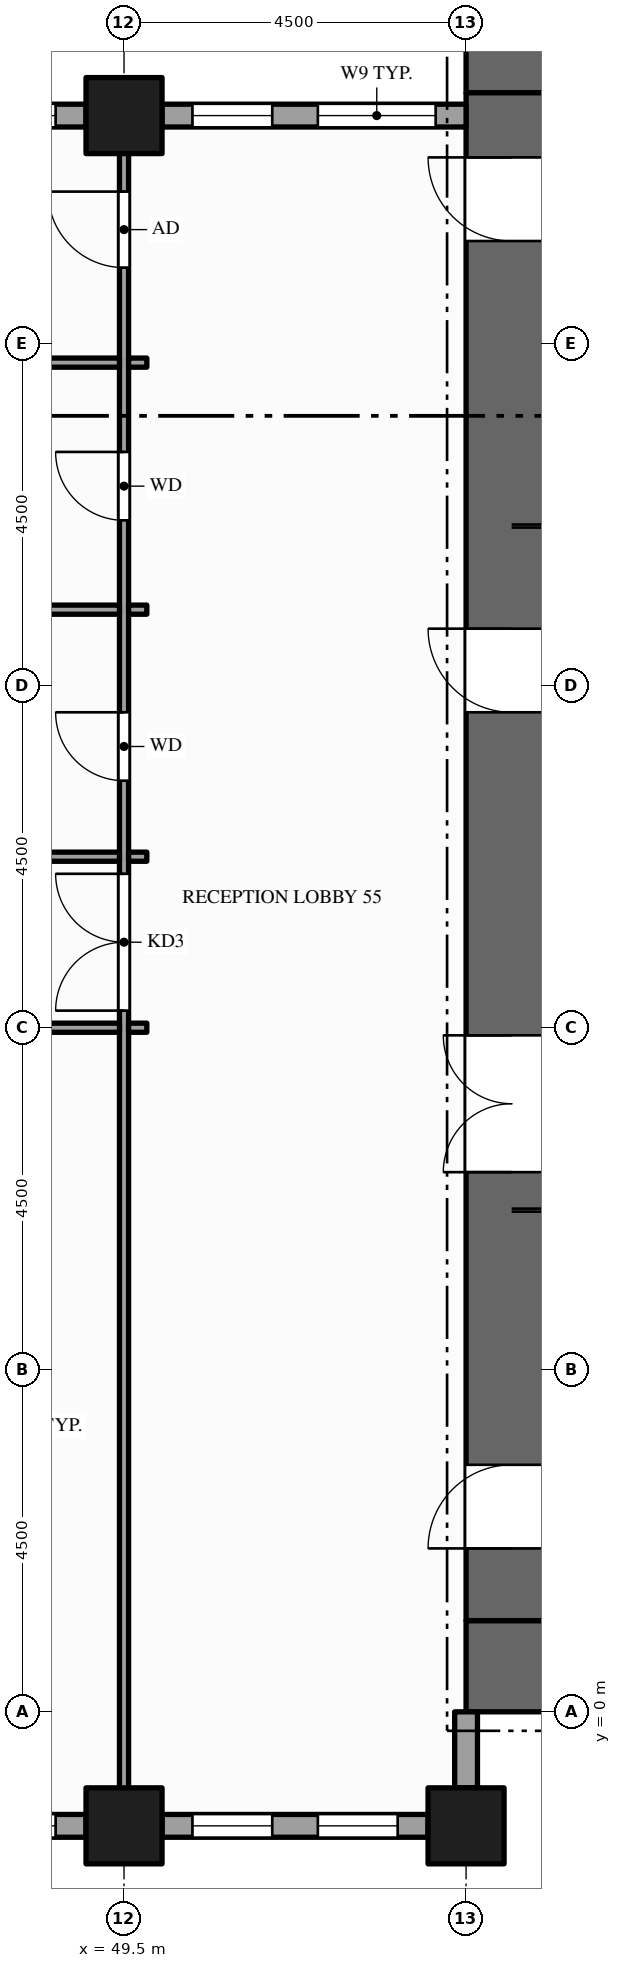
"""IFC4 building model, lengths in metres.
Left out: names, types, materials, properties, quantities, classifications, styles, units other than length and angle.
Written with IfcOpenShell. Run it as: python <this file> out.ifc"""

import sys

from ifc_helpers import new_model, si_unit, direction, frame, frame_2d, origin, origin_2d, place, context, subcontext, project, spatial, rectangle, hollow_rectangle, extrude, element, fill, save


model = new_model("IFC4")
c1 = context("Model", 3, precision=1e-05, world=origin(), true_north=direction((0.0, 1.0)))
c2 = subcontext(c1, "Body", "Model", "MODEL_VIEW")
j1 = project(units=[si_unit("LENGTHUNIT", "METRE"), si_unit("PLANEANGLEUNIT", "RADIAN")], contexts=[c1])
p1 = place(None, origin())
s1 = spatial("IfcSite", under=j1, at=p1, CompositionType="ELEMENT")
p2 = place(p1, origin())
s2 = spatial("IfcBuilding", under=s1, at=p2, CompositionType="ELEMENT")
p3 = place(p2, frame((0.0, 0.0, 95.0)))
s3 = spatial("IfcBuildingStorey", under=s2, at=p3, CompositionType="ELEMENT", Elevation=95.0)
for number, where, z_axis, x_axis in (
    (1, (67.5, 0.6, -0.15), (0.0, 0.0, 1.0), (-1.0, 0.0, 0.0)),
    (2, (54.0, 21.9, -0.15), (0.0, 0.0, 1.0), (1.0, 0.0, 0.0)),
):
    element("IfcWall", number, at=place(p3, frame(where, z_axis=z_axis, x_axis=x_axis)), inside=s3, PredefinedType="SHEAR", context=c2, shape_type="SweptSolid", body=[
        extrude(rectangle(XDim=13.5, YDim=1.2, at=frame_2d((6.75, 0.0))), origin(), (0.0, 0.0, 1.0), 4.0),
    ])
p4 = place(p3, frame((54.6, 1.2, -0.15), z_axis=(0.0, 0.0, 1.0), x_axis=(0.0, 1.0, 0.0)))
e3 = element("IfcWall", 3, at=p4, inside=s3, PredefinedType="SHEAR", context=c2, shape_type="SweptSolid", body=[
    extrude(rectangle(XDim=20.1, YDim=1.2, at=frame_2d((10.05, 0.0))), origin(), (0.0, 0.0, 1.0), 4.0),
])
p5 = place(p4, frame((5.9, 0.0, 0.15)))
e4 = element("IfcOpeningElement", 4, at=p5, cuts=e3, PredefinedType="OPENING", context=c2, shape_type="SweptSolid", body=[
    extrude(rectangle(XDim=1.8, YDim=2.1, at=frame_2d((0.9, 1.05))), frame((0.0, 0.61, 0.0), z_axis=(0.0, -1.0, 0.0), x_axis=(1.0, 0.0, 0.0)), (0.0, 0.0, 1.0), 1.22),
])
p6 = place(p4, frame((11.95, 0.0, 0.15)))
e5 = element("IfcOpeningElement", 5, at=p6, cuts=e3, PredefinedType="OPENING", context=c2, shape_type="SweptSolid", body=[
    extrude(rectangle(XDim=1.1, YDim=2.1, at=frame_2d((0.55, 1.05))), frame((0.0, 0.61, 0.0), z_axis=(0.0, -1.0, 0.0), x_axis=(1.0, 0.0, 0.0)), (0.0, 0.0, 1.0), 1.22),
])
p7 = place(p4, frame((0.95, 0.0, 0.15)))
e6 = element("IfcOpeningElement", 6, at=p7, cuts=e3, PredefinedType="OPENING", context=c2, shape_type="SweptSolid", body=[
    extrude(rectangle(XDim=1.1, YDim=2.1, at=frame_2d((0.55, 1.05))), frame((0.0, 0.61, 0.0), z_axis=(0.0, -1.0, 0.0), x_axis=(1.0, 0.0, 0.0)), (0.0, 0.0, 1.0), 1.22),
])
p8 = place(p4, frame((18.15, 0.0, 0.15)))
e7 = element("IfcOpeningElement", 7, at=p8, cuts=e3, PredefinedType="OPENING", context=c2, shape_type="SweptSolid", body=[
    extrude(rectangle(XDim=1.1, YDim=2.1, at=frame_2d((0.55, 1.05))), frame((0.0, 0.61, 0.0), z_axis=(0.0, -1.0, 0.0), x_axis=(1.0, 0.0, 0.0)), (0.0, 0.0, 1.0), 1.22),
])
for number, where, z_axis, x_axis in (
    (8, (49.5, -1.5, -0.15), (0.0, 0.0, 1.0), (1.0, 0.0, 0.0)),
    (9, (49.5, 21.0, -0.15), (0.0, 0.0, 1.0), (1.0, 0.0, 0.0)),
    (10, (54.0, -1.5, -0.15), (0.0, 0.0, 1.0), (1.0, 0.0, 0.0)),
):
    element("IfcColumn", number, at=place(p3, frame(where, z_axis=z_axis, x_axis=x_axis)), inside=s3, PredefinedType="COLUMN", context=c2, shape_type="SweptSolid", body=[
        extrude(hollow_rectangle(XDim=1.0, YDim=1.0, WallThickness=0.05, at=origin_2d()), origin(), (0.0, 0.0, 1.0), 4.0),
    ])
p9 = place(p3, frame((45.5, -1.5, 0.0), z_axis=(0.0, 0.0, 1.0), x_axis=(1.0, 0.0, 0.0)))
e11 = element("IfcWall", 11, at=p9, inside=s3, PredefinedType="STANDARD", context=c2, shape_type="SweptSolid", body=[
    extrude(rectangle(XDim=3.5, YDim=0.3, at=frame_2d((1.75, 0.0))), origin(), (0.0, 0.0, 1.0), 3.154),
])
p10 = place(p9, frame((0.4, 0.0, 0.9)))
e12 = element("IfcOpeningElement", 12, at=p10, cuts=e11, PredefinedType="OPENING", context=c2, shape_type="SweptSolid", body=[
    extrude(rectangle(XDim=1.05, YDim=2.0, at=frame_2d((0.525, 1.0))), frame((0.0, 0.16, 0.0), z_axis=(0.0, -1.0, 0.0), x_axis=(1.0, 0.0, 0.0)), (0.0, 0.0, 1.0), 0.32),
])
p11 = place(p9, frame((2.05, 0.0, 0.9)))
e13 = element("IfcOpeningElement", 13, at=p11, cuts=e11, PredefinedType="OPENING", context=c2, shape_type="SweptSolid", body=[
    extrude(rectangle(XDim=1.05, YDim=2.0, at=frame_2d((0.525, 1.0))), frame((0.0, 0.16, 0.0), z_axis=(0.0, -1.0, 0.0), x_axis=(1.0, 0.0, 0.0)), (0.0, 0.0, 1.0), 0.32),
])
p12 = place(p3, frame((50.0, -1.5, 0.0), z_axis=(0.0, 0.0, 1.0), x_axis=(1.0, 0.0, 0.0)))
e14 = element("IfcWall", 14, at=p12, inside=s3, PredefinedType="STANDARD", context=c2, shape_type="SweptSolid", body=[
    extrude(rectangle(XDim=3.5, YDim=0.3, at=frame_2d((1.75, 0.0))), origin(), (0.0, 0.0, 1.0), 3.154),
])
p13 = place(p12, frame((0.4, 0.0, 0.9)))
e15 = element("IfcOpeningElement", 15, at=p13, cuts=e14, PredefinedType="OPENING", context=c2, shape_type="SweptSolid", body=[
    extrude(rectangle(XDim=1.05, YDim=2.0, at=frame_2d((0.525, 1.0))), frame((0.0, 0.16, 0.0), z_axis=(0.0, -1.0, 0.0), x_axis=(1.0, 0.0, 0.0)), (0.0, 0.0, 1.0), 0.32),
])
p14 = place(p12, frame((2.05, 0.0, 0.9)))
e16 = element("IfcOpeningElement", 16, at=p14, cuts=e14, PredefinedType="OPENING", context=c2, shape_type="SweptSolid", body=[
    extrude(rectangle(XDim=1.05, YDim=2.0, at=frame_2d((0.525, 1.0))), frame((0.0, 0.16, 0.0), z_axis=(0.0, -1.0, 0.0), x_axis=(1.0, 0.0, 0.0)), (0.0, 0.0, 1.0), 0.32),
])
p15 = place(p3, frame((54.0, -1.0, 0.0), z_axis=(0.0, 0.0, 1.0), x_axis=(0.0, 1.0, 0.0)))
e17 = element("IfcWall", 17, at=p15, inside=s3, PredefinedType="STANDARD", context=c2, shape_type="SweptSolid", body=[
    extrude(rectangle(XDim=1.0, YDim=0.3, at=frame_2d((0.5, 0.0))), origin(), (0.0, 0.0, 1.0), 3.154),
])
p16 = place(p3, frame((54.0, 21.0, 0.0), z_axis=(0.0, 0.0, 1.0), x_axis=(-1.0, 0.0, 0.0)))
e18 = element("IfcWall", 18, at=p16, inside=s3, PredefinedType="STANDARD", context=c2, shape_type="SweptSolid", body=[
    extrude(rectangle(XDim=4.0, YDim=0.3, at=frame_2d((2.0, 0.0))), origin(), (0.0, 0.0, 1.0), 3.154),
])
p17 = place(p16, frame((0.4, 0.0, 0.9)))
e19 = element("IfcOpeningElement", 19, at=p17, cuts=e18, PredefinedType="OPENING", context=c2, shape_type="SweptSolid", body=[
    extrude(rectangle(XDim=1.55, YDim=2.0, at=frame_2d((0.775, 1.0))), frame((0.0, 0.16, 0.0), z_axis=(0.0, -1.0, 0.0), x_axis=(1.0, 0.0, 0.0)), (0.0, 0.0, 1.0), 0.32),
])
p18 = place(p16, frame((2.55, 0.0, 0.9)))
e20 = element("IfcOpeningElement", 20, at=p18, cuts=e18, PredefinedType="OPENING", context=c2, shape_type="SweptSolid", body=[
    extrude(rectangle(XDim=1.05, YDim=2.0, at=frame_2d((0.525, 1.0))), frame((0.0, 0.16, 0.0), z_axis=(0.0, -1.0, 0.0), x_axis=(1.0, 0.0, 0.0)), (0.0, 0.0, 1.0), 0.32),
])
p19 = place(p3, frame((49.0, 21.0, 0.0), z_axis=(0.0, 0.0, 1.0), x_axis=(-1.0, 0.0, 0.0)))
e21 = element("IfcWall", 21, at=p19, inside=s3, PredefinedType="STANDARD", context=c2, shape_type="SweptSolid", body=[
    extrude(rectangle(XDim=3.5, YDim=0.3, at=frame_2d((1.75, 0.0))), origin(), (0.0, 0.0, 1.0), 3.154),
])
p20 = place(p19, frame((0.4, 0.0, 0.9)))
e22 = element("IfcOpeningElement", 22, at=p20, cuts=e21, PredefinedType="OPENING", context=c2, shape_type="SweptSolid", body=[
    extrude(rectangle(XDim=1.05, YDim=2.0, at=frame_2d((0.525, 1.0))), frame((0.0, 0.16, 0.0), z_axis=(0.0, -1.0, 0.0), x_axis=(1.0, 0.0, 0.0)), (0.0, 0.0, 1.0), 0.32),
])
p21 = place(p19, frame((2.05, 0.0, 0.9)))
e23 = element("IfcOpeningElement", 23, at=p21, cuts=e21, PredefinedType="OPENING", context=c2, shape_type="SweptSolid", body=[
    extrude(rectangle(XDim=1.05, YDim=2.0, at=frame_2d((0.525, 1.0))), frame((0.0, 0.16, 0.0), z_axis=(0.0, -1.0, 0.0), x_axis=(1.0, 0.0, 0.0)), (0.0, 0.0, 1.0), 0.32),
])
p22 = place(p3, frame((49.5, -1.35, 0.0), z_axis=(0.0, 0.0, 1.0), x_axis=(0.0, 1.0, 0.0)))
e24 = element("IfcWall", 24, at=p22, inside=s3, PredefinedType="PARTITIONING", context=c2, shape_type="SweptSolid", body=[
    extrude(rectangle(XDim=22.2, YDim=0.12, at=frame_2d((11.1, 0.0))), origin(), (0.0, 0.0, 1.0), 2.938),
])
p23 = place(p22, frame((10.575, 0.0, 0.0)))
e25 = element("IfcOpeningElement", 25, at=p23, cuts=e24, PredefinedType="OPENING", context=c2, shape_type="SweptSolid", body=[
    extrude(rectangle(XDim=1.8, YDim=2.1, at=frame_2d((0.9, 1.05))), frame((0.0, 0.07, 0.0), z_axis=(0.0, -1.0, 0.0), x_axis=(1.0, 0.0, 0.0)), (0.0, 0.0, 1.0), 0.14),
])
p24 = place(p22, frame((13.6, 0.0, 0.0)))
e26 = element("IfcOpeningElement", 26, at=p24, cuts=e24, PredefinedType="OPENING", context=c2, shape_type="SweptSolid", body=[
    extrude(rectangle(XDim=0.9, YDim=2.1, at=frame_2d((0.45, 1.05))), frame((0.0, 0.07, 0.0), z_axis=(0.0, -1.0, 0.0), x_axis=(1.0, 0.0, 0.0)), (0.0, 0.0, 1.0), 0.14),
])
p25 = place(p22, frame((17.025, 0.0, 0.0)))
e27 = element("IfcOpeningElement", 27, at=p25, cuts=e24, PredefinedType="OPENING", context=c2, shape_type="SweptSolid", body=[
    extrude(rectangle(XDim=0.9, YDim=2.1, at=frame_2d((0.45, 1.05))), frame((0.0, 0.07, 0.0), z_axis=(0.0, -1.0, 0.0), x_axis=(1.0, 0.0, 0.0)), (0.0, 0.0, 1.0), 0.14),
])
p26 = place(p22, frame((20.35, 0.0, 0.0)))
e28 = element("IfcOpeningElement", 28, at=p26, cuts=e24, PredefinedType="OPENING", context=c2, shape_type="SweptSolid", body=[
    extrude(rectangle(XDim=1.0, YDim=2.1, at=frame_2d((0.5, 1.05))), frame((0.0, 0.07, 0.0), z_axis=(0.0, -1.0, 0.0), x_axis=(1.0, 0.0, 0.0)), (0.0, 0.0, 1.0), 0.14),
])
p27 = place(p3, frame((42.81, 9.0, 0.0), z_axis=(0.0, 0.0, 1.0), x_axis=(1.0, 0.0, 0.0)))
e29 = element("IfcWall", 29, at=p27, inside=s3, PredefinedType="PARTITIONING", context=c2, shape_type="SweptSolid", body=[
    extrude(rectangle(XDim=6.63, YDim=0.12, at=frame_2d((3.315, 0.0))), origin(), (0.0, 0.0, 1.0), 2.938),
])
p28 = place(p27, frame((2.815, 0.0, 0.0)))
e30 = element("IfcOpeningElement", 30, at=p28, cuts=e29, PredefinedType="OPENING", context=c2, shape_type="SweptSolid", body=[
    extrude(rectangle(XDim=1.0, YDim=2.1, at=frame_2d((0.5, 1.05))), frame((0.0, 0.07, 0.0), z_axis=(0.0, -1.0, 0.0), x_axis=(1.0, 0.0, 0.0)), (0.0, 0.0, 1.0), 0.14),
])
p29 = place(p3, frame((49.56, 9.0, 0.0), z_axis=(0.0, 0.0, 1.0), x_axis=(1.0, 0.0, 0.0)))
e31 = element("IfcWall", 31, at=p29, inside=s3, PredefinedType="PARTITIONING", context=c2, shape_type="SweptSolid", body=[
    extrude(rectangle(XDim=0.24, YDim=0.12, at=frame_2d((0.12, 0.0))), origin(), (0.0, 0.0, 1.0), 2.938),
])
p30 = place(p3, frame((45.06, 11.25, 0.0), z_axis=(0.0, 0.0, 1.0), x_axis=(1.0, 0.0, 0.0)))
e32 = element("IfcWall", 32, at=p30, inside=s3, PredefinedType="PARTITIONING", context=c2, shape_type="SweptSolid", body=[
    extrude(rectangle(XDim=4.38, YDim=0.12, at=frame_2d((2.19, 0.0))), origin(), (0.0, 0.0, 1.0), 2.938),
])
p31 = place(p3, frame((49.56, 11.25, 0.0), z_axis=(0.0, 0.0, 1.0), x_axis=(1.0, 0.0, 0.0)))
e33 = element("IfcWall", 33, at=p31, inside=s3, PredefinedType="PARTITIONING", context=c2, shape_type="SweptSolid", body=[
    extrude(rectangle(XDim=0.24, YDim=0.12, at=frame_2d((0.12, 0.0))), origin(), (0.0, 0.0, 1.0), 2.938),
])
p32 = place(p3, frame((45.06, 14.5, 0.0), z_axis=(0.0, 0.0, 1.0), x_axis=(1.0, 0.0, 0.0)))
e34 = element("IfcWall", 34, at=p32, inside=s3, PredefinedType="PARTITIONING", context=c2, shape_type="SweptSolid", body=[
    extrude(rectangle(XDim=4.38, YDim=0.12, at=frame_2d((2.19, 0.0))), origin(), (0.0, 0.0, 1.0), 2.938),
])
p33 = place(p3, frame((49.56, 14.5, 0.0), z_axis=(0.0, 0.0, 1.0), x_axis=(1.0, 0.0, 0.0)))
e35 = element("IfcWall", 35, at=p33, inside=s3, PredefinedType="PARTITIONING", context=c2, shape_type="SweptSolid", body=[
    extrude(rectangle(XDim=0.24, YDim=0.12, at=frame_2d((0.12, 0.0))), origin(), (0.0, 0.0, 1.0), 2.938),
])
p34 = place(p3, frame((45.06, 17.75, 0.0), z_axis=(0.0, 0.0, 1.0), x_axis=(1.0, 0.0, 0.0)))
e36 = element("IfcWall", 36, at=p34, inside=s3, PredefinedType="PARTITIONING", context=c2, shape_type="SweptSolid", body=[
    extrude(rectangle(XDim=4.38, YDim=0.12, at=frame_2d((2.19, 0.0))), origin(), (0.0, 0.0, 1.0), 2.938),
])
p35 = place(p3, frame((49.56, 17.75, 0.0), z_axis=(0.0, 0.0, 1.0), x_axis=(1.0, 0.0, 0.0)))
e37 = element("IfcWall", 37, at=p35, inside=s3, PredefinedType="PARTITIONING", context=c2, shape_type="SweptSolid", body=[
    extrude(rectangle(XDim=0.24, YDim=0.12, at=frame_2d((0.12, 0.0))), origin(), (0.0, 0.0, 1.0), 2.938),
])
p36 = place(p11, origin())
e38 = element("IfcWindow", 38, at=p36, inside=s3, PartitioningType="SINGLE_PANEL", PredefinedType="WINDOW", context=c2, shape_type="SweptSolid", body=[
    extrude(rectangle(XDim=1.05, YDim=2.0, at=frame_2d((0.525, 1.0))), frame((0.0, 0.03, 0.0), z_axis=(0.0, -1.0, 0.0), x_axis=(1.0, 0.0, 0.0)), (0.0, 0.0, 1.0), 0.06),
])
fill(e13, e38)
p37 = place(p13, origin())
e39 = element("IfcWindow", 39, at=p37, inside=s3, PartitioningType="SINGLE_PANEL", PredefinedType="WINDOW", context=c2, shape_type="SweptSolid", body=[
    extrude(rectangle(XDim=1.05, YDim=2.0, at=frame_2d((0.525, 1.0))), frame((0.0, 0.03, 0.0), z_axis=(0.0, -1.0, 0.0), x_axis=(1.0, 0.0, 0.0)), (0.0, 0.0, 1.0), 0.06),
])
fill(e15, e39)
p38 = place(p14, origin())
e40 = element("IfcWindow", 40, at=p38, inside=s3, PartitioningType="SINGLE_PANEL", PredefinedType="WINDOW", context=c2, shape_type="SweptSolid", body=[
    extrude(rectangle(XDim=1.05, YDim=2.0, at=frame_2d((0.525, 1.0))), frame((0.0, 0.03, 0.0), z_axis=(0.0, -1.0, 0.0), x_axis=(1.0, 0.0, 0.0)), (0.0, 0.0, 1.0), 0.06),
])
fill(e16, e40)
p39 = place(p17, origin())
e41 = element("IfcWindow", 41, at=p39, inside=s3, PartitioningType="SINGLE_PANEL", PredefinedType="WINDOW", context=c2, shape_type="SweptSolid", body=[
    extrude(rectangle(XDim=1.55, YDim=2.0, at=frame_2d((0.775, 1.0))), frame((0.0, 0.03, 0.0), z_axis=(0.0, -1.0, 0.0), x_axis=(1.0, 0.0, 0.0)), (0.0, 0.0, 1.0), 0.06),
])
fill(e19, e41)
p40 = place(p18, origin())
e42 = element("IfcWindow", 42, at=p40, inside=s3, PartitioningType="SINGLE_PANEL", PredefinedType="WINDOW", context=c2, shape_type="SweptSolid", body=[
    extrude(rectangle(XDim=1.05, YDim=2.0, at=frame_2d((0.525, 1.0))), frame((0.0, 0.03, 0.0), z_axis=(0.0, -1.0, 0.0), x_axis=(1.0, 0.0, 0.0)), (0.0, 0.0, 1.0), 0.06),
])
fill(e20, e42)
p41 = place(p20, origin())
e43 = element("IfcWindow", 43, at=p41, inside=s3, PartitioningType="SINGLE_PANEL", PredefinedType="WINDOW", context=c2, shape_type="SweptSolid", body=[
    extrude(rectangle(XDim=1.05, YDim=2.0, at=frame_2d((0.525, 1.0))), frame((0.0, 0.03, 0.0), z_axis=(0.0, -1.0, 0.0), x_axis=(1.0, 0.0, 0.0)), (0.0, 0.0, 1.0), 0.06),
])
fill(e22, e43)
p42 = place(p5, origin())
e44 = element("IfcDoor", 44, at=p42, inside=s3, OperationType="DOUBLE_DOOR_SINGLE_SWING", PredefinedType="DOOR", context=c2, shape_type="SweptSolid", body=[
    extrude(rectangle(XDim=1.8, YDim=2.1, at=frame_2d((0.9, 1.05))), frame((0.0, 0.025, 0.0), z_axis=(0.0, -1.0, 0.0), x_axis=(1.0, 0.0, 0.0)), (0.0, 0.0, 1.0), 0.05),
])
fill(e4, e44)
p43 = place(p6, origin())
e45 = element("IfcDoor", 45, at=p43, inside=s3, OperationType="SINGLE_SWING_RIGHT", PredefinedType="DOOR", context=c2, shape_type="SweptSolid", body=[
    extrude(rectangle(XDim=1.1, YDim=2.1, at=frame_2d((0.55, 1.05))), frame((0.0, 0.025, 0.0), z_axis=(0.0, -1.0, 0.0), x_axis=(1.0, 0.0, 0.0)), (0.0, 0.0, 1.0), 0.05),
])
fill(e5, e45)
p44 = place(p7, origin())
e46 = element("IfcDoor", 46, at=p44, inside=s3, OperationType="SINGLE_SWING_LEFT", PredefinedType="DOOR", context=c2, shape_type="SweptSolid", body=[
    extrude(rectangle(XDim=1.1, YDim=2.1, at=frame_2d((0.55, 1.05))), frame((0.0, 0.025, 0.0), z_axis=(0.0, -1.0, 0.0), x_axis=(1.0, 0.0, 0.0)), (0.0, 0.0, 1.0), 0.05),
])
fill(e6, e46)
p45 = place(p8, origin())
e47 = element("IfcDoor", 47, at=p45, inside=s3, OperationType="SINGLE_SWING_RIGHT", PredefinedType="DOOR", context=c2, shape_type="SweptSolid", body=[
    extrude(rectangle(XDim=1.1, YDim=2.1, at=frame_2d((0.55, 1.05))), frame((0.0, 0.025, 0.0), z_axis=(0.0, -1.0, 0.0), x_axis=(1.0, 0.0, 0.0)), (0.0, 0.0, 1.0), 0.05),
])
fill(e7, e47)
p46 = place(p23, origin())
e48 = element("IfcDoor", 48, at=p46, inside=s3, OperationType="DOUBLE_DOOR_SINGLE_SWING", PredefinedType="DOOR", context=c2, shape_type="SweptSolid", body=[
    extrude(rectangle(XDim=1.8, YDim=2.1, at=frame_2d((0.9, 1.05))), frame((0.0, 0.025, 0.0), z_axis=(0.0, -1.0, 0.0), x_axis=(1.0, 0.0, 0.0)), (0.0, 0.0, 1.0), 0.05),
])
fill(e25, e48)
p47 = place(p24, origin())
e49 = element("IfcDoor", 49, at=p47, inside=s3, OperationType="SINGLE_SWING_RIGHT", PredefinedType="DOOR", context=c2, shape_type="SweptSolid", body=[
    extrude(rectangle(XDim=0.9, YDim=2.1, at=frame_2d((0.45, 1.05))), frame((0.0, 0.025, 0.0), z_axis=(0.0, -1.0, 0.0), x_axis=(1.0, 0.0, 0.0)), (0.0, 0.0, 1.0), 0.05),
])
fill(e26, e49)
p48 = place(p25, origin())
e50 = element("IfcDoor", 50, at=p48, inside=s3, OperationType="SINGLE_SWING_RIGHT", PredefinedType="DOOR", context=c2, shape_type="SweptSolid", body=[
    extrude(rectangle(XDim=0.9, YDim=2.1, at=frame_2d((0.45, 1.05))), frame((0.0, 0.025, 0.0), z_axis=(0.0, -1.0, 0.0), x_axis=(1.0, 0.0, 0.0)), (0.0, 0.0, 1.0), 0.05),
])
fill(e27, e50)
p49 = place(p26, origin())
e51 = element("IfcDoor", 51, at=p49, inside=s3, OperationType="SINGLE_SWING_RIGHT", PredefinedType="DOOR", context=c2, shape_type="SweptSolid", body=[
    extrude(rectangle(XDim=1.0, YDim=2.1, at=frame_2d((0.5, 1.05))), frame((0.0, 0.025, 0.0), z_axis=(0.0, -1.0, 0.0), x_axis=(1.0, 0.0, 0.0)), (0.0, 0.0, 1.0), 0.05),
])
fill(e28, e51)
save(model, sys.argv[1])
